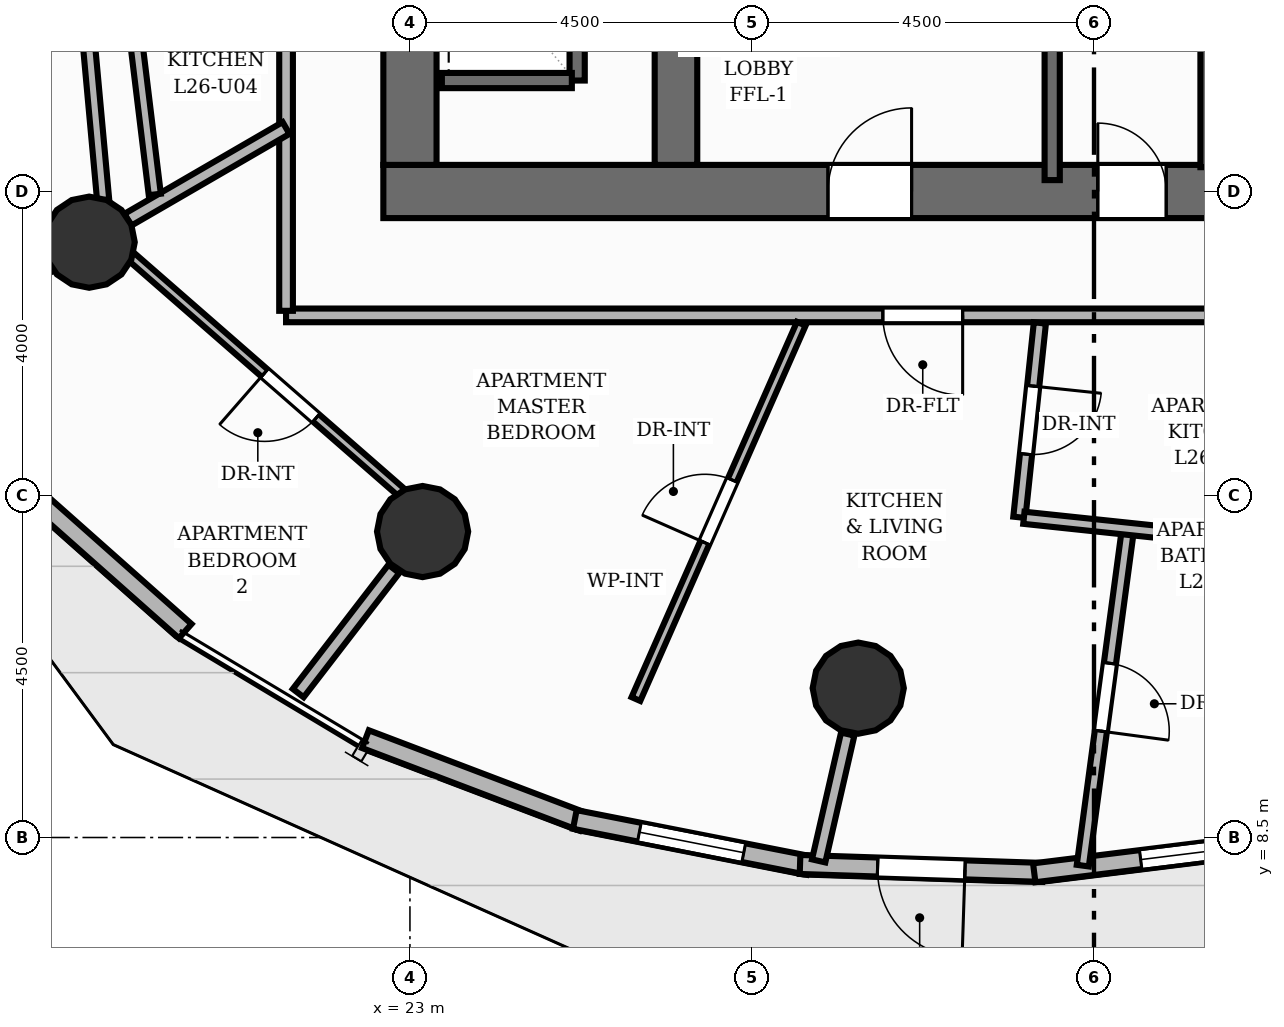
"""IFC4 building model, lengths in metres.
Left out: names, types, materials, properties, quantities, classifications, styles, units other than length and angle.
Written with IfcOpenShell. Run it as: python <this file> out.ifc"""

import sys

from ifc_helpers import new_model, si_unit, direction, frame, frame_2d, origin, origin_2d, place, context, subcontext, project, spatial, rectangle, circle, extrude, element, fill, save


model = new_model("IFC4")
c1 = context("Model", 3, precision=1e-05, world=origin(), true_north=direction((0.0, 1.0)))
c2 = subcontext(c1, "Body", "Model", "MODEL_VIEW")
j1 = project(units=[si_unit("LENGTHUNIT", "METRE"), si_unit("PLANEANGLEUNIT", "RADIAN")], contexts=[c1])
p1 = place(None, origin())
s1 = spatial("IfcSite", under=j1, at=p1, CompositionType="ELEMENT")
p2 = place(p1, origin())
s2 = spatial("IfcBuilding", under=s1, at=p2, CompositionType="ELEMENT")
p3 = place(p2, frame((0.0, 0.0, 90.08)))
s3 = spatial("IfcBuildingStorey", under=s2, at=p3, CompositionType="ELEMENT", Elevation=90.08)
p4 = place(p3, frame((22.65, 17.0, 0.0), z_axis=(0.0, 0.0, 1.0), x_axis=(1.0, 0.0, 0.0)))
e1 = element("IfcWall", 1, at=p4, inside=s3, PredefinedType="SHEAR", context=c2, shape_type="SweptSolid", body=[
    extrude(rectangle(XDim=18.7, YDim=0.7, at=frame_2d((9.35, 0.0))), origin(), (0.0, 0.0, 1.0), 3.2),
])
p5 = place(p4, frame((5.85, 0.0, 0.0)))
e2 = element("IfcOpeningElement", 2, at=p5, cuts=e1, PredefinedType="OPENING", context=c2, shape_type="SweptSolid", body=[
    extrude(rectangle(XDim=1.1, YDim=2.15, at=frame_2d((0.55, 1.075))), frame((0.0, 0.36, 0.0), z_axis=(0.0, -1.0, 0.0), x_axis=(1.0, 0.0, 0.0)), (0.0, 0.0, 1.0), 0.72),
])
p6 = place(p4, frame((9.4, 0.0, 0.0)))
e3 = element("IfcOpeningElement", 3, at=p6, cuts=e1, PredefinedType="OPENING", context=c2, shape_type="SweptSolid", body=[
    extrude(rectangle(XDim=0.9, YDim=2.1, at=frame_2d((0.45, 1.05))), frame((0.0, 0.36, 0.0), z_axis=(0.0, -1.0, 0.0), x_axis=(1.0, 0.0, 0.0)), (0.0, 0.0, 1.0), 0.72),
])
p7 = place(p3, frame((23.0, 17.35, 0.0), z_axis=(0.0, 0.0, 1.0), x_axis=(0.0, 1.0, 0.0)))
e4 = element("IfcWall", 4, at=p7, inside=s3, PredefinedType="SHEAR", context=c2, shape_type="SweptSolid", body=[
    extrude(rectangle(XDim=13.3, YDim=0.7, at=frame_2d((6.65, 0.0))), origin(), (0.0, 0.0, 1.0), 3.2),
])
p8 = place(p3, frame((26.5, 17.35, 0.0), z_axis=(0.0, 0.0, 1.0), x_axis=(0.0, 1.0, 0.0)))
e5 = element("IfcWall", 5, at=p8, inside=s3, PredefinedType="SHEAR", context=c2, shape_type="SweptSolid", body=[
    extrude(rectangle(XDim=13.3, YDim=0.56, at=frame_2d((6.65, 0.0))), origin(), (0.0, 0.0, 1.0), 3.2),
])
for number, where, z_axis, x_axis in (
    (6, (18.78, 16.333, 0.0), (0.0, 0.0, 1.0), (1.0, 0.0, 0.0)),
    (7, (23.167, 12.526, 0.0), (0.0, 0.0, 1.0), (1.0, 0.0, 0.0)),
    (8, (28.898, 10.465, 0.0), (0.0, 0.0, 1.0), (1.0, 0.0, 0.0)),
):
    element("IfcColumn", number, at=place(p3, frame(where, z_axis=z_axis, x_axis=x_axis)), inside=s3, PredefinedType="COLUMN", context=c2, shape_type="SweptSolid", body=[
        extrude(circle(Radius=0.6, at=origin_2d()), origin(), (0.0, 0.0, 1.0), 3.2),
    ])
p9 = place(p3, frame((20.043, 11.216, 0.0), z_axis=(0.0, 0.0, 1.0), x_axis=(-0.747828492436, 0.663891968547, 0.0)))
e9 = element("IfcWall", 9, at=p9, inside=s3, PredefinedType="SOLIDWALL", context=c2, shape_type="SweptSolid", body=[
    extrude(rectangle(XDim=2.923, YDim=0.25, at=frame_2d((1.461, 0.0))), origin(), (0.0, 0.0, 1.0), 2.96),
])
p10 = place(p3, frame((25.276, 8.707, 0.0), z_axis=(0.0, 0.0, 1.0), x_axis=(-0.934815891493, 0.355132720277, 0.0)))
e10 = element("IfcWall", 10, at=p10, inside=s3, PredefinedType="SOLIDWALL", context=c2, shape_type="SweptSolid", body=[
    extrude(rectangle(XDim=3.061, YDim=0.25, at=frame_2d((1.53, 0.0))), origin(), (0.0, 0.0, 1.0), 2.96),
])
p11 = place(p3, frame((28.242, 8.133, 0.0), z_axis=(0.0, 0.0, 1.0), x_axis=(-0.981187677549, 0.193056316721, 0.0)))
e11 = element("IfcWall", 11, at=p11, inside=s3, PredefinedType="SOLIDWALL", context=c2, shape_type="SweptSolid", body=[
    extrude(rectangle(XDim=3.131, YDim=0.25, at=frame_2d((1.565, 0.0))), origin(), (0.0, 0.0, 1.0), 2.96),
])
p12 = place(p11, frame((0.866, 0.0, 0.85)))
e12 = element("IfcOpeningElement", 12, at=p12, cuts=e11, PredefinedType="OPENING", context=c2, shape_type="SweptSolid", body=[
    extrude(rectangle(XDim=1.4, YDim=1.55, at=frame_2d((0.7, 0.775))), frame((0.0, 0.135, 0.0), z_axis=(0.0, -1.0, 0.0), x_axis=(1.0, 0.0, 0.0)), (0.0, 0.0, 1.0), 0.27),
])
p13 = place(p3, frame((31.323, 8.041, 0.0), z_axis=(0.0, 0.0, 1.0), x_axis=(-0.999464092211, 0.032734208101, 0.0)))
e13 = element("IfcWall", 13, at=p13, inside=s3, PredefinedType="SOLIDWALL", context=c2, shape_type="SweptSolid", body=[
    extrude(rectangle(XDim=3.192, YDim=0.25, at=frame_2d((1.596, 0.0))), origin(), (0.0, 0.0, 1.0), 2.96),
])
p14 = place(p13, frame((1.021, 0.0, 0.0)))
e14 = element("IfcOpeningElement", 14, at=p14, cuts=e13, PredefinedType="OPENING", context=c2, shape_type="SweptSolid", body=[
    extrude(rectangle(XDim=1.15, YDim=2.2, at=frame_2d((0.575, 1.1))), frame((0.0, 0.135, 0.0), z_axis=(0.0, -1.0, 0.0), x_axis=(1.0, 0.0, 0.0)), (0.0, 0.0, 1.0), 0.27),
])
p15 = place(p3, frame((34.425, 8.434, 0.0), z_axis=(0.0, 0.0, 1.0), x_axis=(-0.99241077266, -0.122966899235, 0.0)))
e15 = element("IfcWall", 15, at=p15, inside=s3, PredefinedType="SOLIDWALL", context=c2, shape_type="SweptSolid", body=[
    extrude(rectangle(XDim=3.236, YDim=0.25, at=frame_2d((1.618, 0.0))), origin(), (0.0, 0.0, 1.0), 2.96),
])
p16 = place(p15, frame((0.175, 0.0, 0.85)))
e16 = element("IfcOpeningElement", 16, at=p16, cuts=e15, PredefinedType="OPENING", context=c2, shape_type="SweptSolid", body=[
    extrude(rectangle(XDim=1.65, YDim=1.55, at=frame_2d((0.825, 0.775))), frame((0.0, 0.135, 0.0), z_axis=(0.0, -1.0, 0.0), x_axis=(1.0, 0.0, 0.0)), (0.0, 0.0, 1.0), 0.27),
])
p17 = place(p3, frame((31.45, 17.15, 0.0), z_axis=(0.0, 0.0, 1.0), x_axis=(0.0, 1.0, 0.0)))
e17 = element("IfcWall", 17, at=p17, inside=s3, PredefinedType="SHEAR", context=c2, shape_type="SweptSolid", body=[
    extrude(rectangle(XDim=3.5, YDim=0.2, at=frame_2d((1.75, 0.0))), origin(), (0.0, 0.0, 1.0), 3.2),
])
p18 = place(p3, frame((25.2, 18.46, 0.0), z_axis=(0.0, 0.0, 1.0), x_axis=(0.0, 1.0, 0.0)))
e18 = element("IfcWall", 18, at=p18, inside=s3, PredefinedType="SHEAR", context=c2, shape_type="SweptSolid", body=[
    extrude(rectangle(XDim=11.08, YDim=0.2, at=frame_2d((5.54, 0.0))), origin(), (0.0, 0.0, 1.0), 3.2),
])
p19 = place(p3, frame((23.42, 18.46, 0.0), z_axis=(0.0, 0.0, 1.0), x_axis=(1.0, 0.0, 0.0)))
e19 = element("IfcWall", 19, at=p19, inside=s3, PredefinedType="SHEAR", context=c2, shape_type="SweptSolid", body=[
    extrude(rectangle(XDim=1.71, YDim=0.2, at=frame_2d((0.855, 0.0))), origin(), (0.0, 0.0, 1.0), 3.2),
])
p20 = place(p3, frame((33.5, 17.32, 0.0), z_axis=(0.0, 0.0, 1.0), x_axis=(0.0, 1.0, 0.0)))
e20 = element("IfcWall", 20, at=p20, inside=s3, PredefinedType="SHEAR", context=c2, shape_type="SweptSolid", body=[
    extrude(rectangle(XDim=1.86, YDim=0.2, at=frame_2d((0.93, 0.0))), origin(), (0.0, 0.0, 1.0), 3.2),
])
p21 = place(p3, frame((18.243, 16.022, 0.0), z_axis=(0.0, 0.0, 1.0), x_axis=(-0.865046065875, -0.501692439563, 0.0)))
e21 = element("IfcWall", 21, at=p21, inside=s3, PredefinedType="PARTITIONING", context=c2, shape_type="SweptSolid", body=[
    extrude(rectangle(XDim=1.994, YDim=0.18, at=frame_2d((0.997, 0.0))), origin(), (0.0, 0.0, 1.0), 2.26),
])
p22 = place(p3, frame((22.788, 12.034, 0.0), z_axis=(0.0, 0.0, 1.0), x_axis=(-0.609991040385, -0.792408310564, 0.0)))
e22 = element("IfcWall", 22, at=p22, inside=s3, PredefinedType="PARTITIONING", context=c2, shape_type="SweptSolid", body=[
    extrude(rectangle(XDim=2.062, YDim=0.18, at=frame_2d((1.031, 0.0))), origin(), (0.0, 0.0, 1.0), 2.26),
])
p23 = place(p3, frame((28.76, 9.861, 0.0), z_axis=(0.0, 0.0, 1.0), x_axis=(-0.223359217097, -0.974736200281, 0.0)))
e23 = element("IfcWall", 23, at=p23, inside=s3, PredefinedType="PARTITIONING", context=c2, shape_type="SweptSolid", body=[
    extrude(rectangle(XDim=1.712, YDim=0.18, at=frame_2d((0.856, 0.0))), origin(), (0.0, 0.0, 1.0), 2.26),
])
p24 = place(p3, frame((41.695, 15.37, 0.0), z_axis=(0.0, 0.0, 1.0), x_axis=(-1.0, 0.0, 0.0)))
e24 = element("IfcWall", 24, at=p24, inside=s3, PredefinedType="PARTITIONING", context=c2, shape_type="SweptSolid", body=[
    extrude(rectangle(XDim=20.325, YDim=0.18, at=frame_2d((10.163, 0.0))), origin(), (0.0, 0.0, 1.0), 2.955),
])
p25 = place(p24, frame((11.424, 0.0, 0.0)))
e25 = element("IfcOpeningElement", 25, at=p25, cuts=e24, PredefinedType="OPENING", context=c2, shape_type="SweptSolid", body=[
    extrude(rectangle(XDim=1.05, YDim=2.15, at=frame_2d((0.525, 1.075))), frame((0.0, 0.1, 0.0), z_axis=(0.0, -1.0, 0.0), x_axis=(1.0, 0.0, 0.0)), (0.0, 0.0, 1.0), 0.2),
])
p26 = place(p3, frame((21.37, 15.43, 0.0), z_axis=(0.0, 0.0, 1.0), x_axis=(0.0, 1.0, 0.0)))
e26 = element("IfcWall", 26, at=p26, inside=s3, PredefinedType="PARTITIONING", context=c2, shape_type="SweptSolid", body=[
    extrude(rectangle(XDim=7.727, YDim=0.18, at=frame_2d((3.863, 0.0))), origin(), (0.0, 0.0, 1.0), 2.955),
])
p27 = place(p3, frame((32.448, 12.562, 0.0), z_axis=(0.0, 0.0, 1.0), x_axis=(-0.132986130607, -0.991117898671, 0.0)))
e27 = element("IfcWall", 27, at=p27, inside=s3, PredefinedType="PLUMBINGWALL", context=c2, shape_type="SweptSolid", body=[
    extrude(rectangle(XDim=4.472, YDim=0.16, at=frame_2d((2.236, 0.0))), origin(), (0.0, 0.0, 1.0), 2.955),
])
p28 = place(p27, frame((1.786, 0.0, 0.0)))
e28 = element("IfcOpeningElement", 28, at=p28, cuts=e27, PredefinedType="OPENING", context=c2, shape_type="SweptSolid", body=[
    extrude(rectangle(XDim=0.9, YDim=2.1, at=frame_2d((0.45, 1.05))), frame((0.0, 0.09, 0.0), z_axis=(0.0, -1.0, 0.0), x_axis=(1.0, 0.0, 0.0)), (0.0, 0.0, 1.0), 0.18),
])
p29 = place(p3, frame((25.973, 10.322, 0.0), z_axis=(0.0, 0.0, 1.0), x_axis=(0.403235845427, 0.91509608947, 0.0)))
e29 = element("IfcWall", 29, at=p29, inside=s3, PredefinedType="PARTITIONING", context=c2, shape_type="SweptSolid", body=[
    extrude(rectangle(XDim=5.396, YDim=0.125, at=frame_2d((2.698, 0.0))), origin(), (0.0, 0.0, 1.0), 2.955),
])
p30 = place(p29, frame((2.248, 0.0, 0.0)))
e30 = element("IfcOpeningElement", 30, at=p30, cuts=e29, PredefinedType="OPENING", context=c2, shape_type="SweptSolid", body=[
    extrude(rectangle(XDim=0.9, YDim=2.1, at=frame_2d((0.45, 1.05))), frame((0.0, 0.073, 0.0), z_axis=(0.0, -1.0, 0.0), x_axis=(1.0, 0.0, 0.0)), (0.0, 0.0, 1.0), 0.145),
])
p31 = place(p3, frame((31.288, 15.271, 0.0), z_axis=(0.0, 0.0, 1.0), x_axis=(-0.105094954285, -0.994462191631, 0.0)))
e31 = element("IfcWall", 31, at=p31, inside=s3, PredefinedType="PLUMBINGWALL", context=c2, shape_type="SweptSolid", body=[
    extrude(rectangle(XDim=2.572, YDim=0.16, at=frame_2d((1.286, 0.0))), origin(), (0.0, 0.0, 1.0), 2.641),
])
p32 = place(p31, frame((0.836, 0.0, 0.0)))
e32 = element("IfcOpeningElement", 32, at=p32, cuts=e31, PredefinedType="OPENING", context=c2, shape_type="SweptSolid", body=[
    extrude(rectangle(XDim=0.9, YDim=2.1, at=frame_2d((0.45, 1.05))), frame((0.0, 0.09, 0.0), z_axis=(0.0, -1.0, 0.0), x_axis=(1.0, 0.0, 0.0)), (0.0, 0.0, 1.0), 0.18),
])
p33 = place(p3, frame((31.077, 12.707, 0.0), z_axis=(0.0, 0.0, 1.0), x_axis=(0.994472124215, -0.105000924563, 0.0)))
e33 = element("IfcWall", 33, at=p33, inside=s3, PredefinedType="PLUMBINGWALL", context=c2, shape_type="SweptSolid", body=[
    extrude(rectangle(XDim=3.618, YDim=0.16, at=frame_2d((1.809, 0.0))), origin(), (0.0, 0.0, 1.0), 2.955),
])
p34 = place(p3, frame((22.888, 13.04, 0.0), z_axis=(0.0, 0.0, 1.0), x_axis=(-0.753425123405, 0.657533712765, 0.0)))
e34 = element("IfcWall", 34, at=p34, inside=s3, PredefinedType="PARTITIONING", context=c2, shape_type="SweptSolid", body=[
    extrude(rectangle(XDim=4.72, YDim=0.125, at=frame_2d((2.36, 0.0))), origin(), (0.0, 0.0, 1.0), 2.403),
])
p35 = place(p34, frame((1.49, 0.0, 0.0)))
e35 = element("IfcOpeningElement", 35, at=p35, cuts=e34, PredefinedType="OPENING", context=c2, shape_type="SweptSolid", body=[
    extrude(rectangle(XDim=0.9, YDim=2.1, at=frame_2d((0.45, 1.05))), frame((0.0, 0.073, 0.0), z_axis=(0.0, -1.0, 0.0), x_axis=(1.0, 0.0, 0.0)), (0.0, 0.0, 1.0), 0.145),
])
p36 = place(p3, frame((19.288, 16.628, 0.0), z_axis=(0.0, 0.0, 1.0), x_axis=(0.86502326608, 0.501731750182, 0.0)))
e36 = element("IfcWall", 36, at=p36, inside=s3, PredefinedType="PARTITIONING", context=c2, shape_type="SweptSolid", body=[
    extrude(rectangle(XDim=2.407, YDim=0.18, at=frame_2d((1.204, 0.0))), origin(), (0.0, 0.0, 1.0), 2.26),
])
p37 = place(p3, frame((18.964, 16.887, 0.0), z_axis=(0.0, 0.0, 1.0), x_axis=(-0.091023836021, 0.995848714051, 0.0)))
e37 = element("IfcWall", 37, at=p37, inside=s3, PredefinedType="PLUMBINGWALL", context=c2, shape_type="SweptSolid", body=[
    extrude(rectangle(XDim=3.157, YDim=0.16, at=frame_2d((1.579, 0.0))), origin(), (0.0, 0.0, 1.0), 2.955),
])
p38 = place(p3, frame((18.935, 22.782, 0.0), z_axis=(0.0, 0.0, 1.0), x_axis=(0.120703145243, -0.992688647426, 0.0)))
e38 = element("IfcWall", 38, at=p38, inside=s3, PredefinedType="PLUMBINGWALL", context=c2, shape_type="SweptSolid", body=[
    extrude(rectangle(XDim=5.864, YDim=0.16, at=frame_2d((2.932, 0.0))), origin(), (0.0, 0.0, 1.0), 2.955),
])
p39 = place(p38, frame((1.642, 0.0, 0.0)))
e39 = element("IfcOpeningElement", 39, at=p39, cuts=e38, PredefinedType="OPENING", context=c2, shape_type="SweptSolid", body=[
    extrude(rectangle(XDim=0.9, YDim=2.1, at=frame_2d((0.45, 1.05))), frame((0.0, 0.09, 0.0), z_axis=(0.0, -1.0, 0.0), x_axis=(1.0, 0.0, 0.0)), (0.0, 0.0, 1.0), 0.18),
])
p40 = place(p14, origin())
e40 = element("IfcDoor", 40, at=p40, inside=s3, OperationType="SINGLE_SWING_LEFT", PredefinedType="DOOR", context=c2, shape_type="SweptSolid", body=[
    extrude(rectangle(XDim=1.15, YDim=2.2, at=frame_2d((0.575, 1.1))), frame((0.0, 0.025, 0.0), z_axis=(0.0, -1.0, 0.0), x_axis=(1.0, 0.0, 0.0)), (0.0, 0.0, 1.0), 0.05),
])
fill(e14, e40)
p41 = place(p12, origin())
e41 = element("IfcWindow", 41, at=p41, inside=s3, PartitioningType="SINGLE_PANEL", PredefinedType="WINDOW", context=c2, shape_type="SweptSolid", body=[
    extrude(rectangle(XDim=1.4, YDim=1.55, at=frame_2d((0.7, 0.775))), frame((0.0, 0.03, 0.0), z_axis=(0.0, -1.0, 0.0), x_axis=(1.0, 0.0, 0.0)), (0.0, 0.0, 1.0), 0.06),
])
fill(e12, e41)
p42 = place(p16, origin())
e42 = element("IfcWindow", 42, at=p42, inside=s3, PartitioningType="SINGLE_PANEL", PredefinedType="WINDOW", context=c2, shape_type="SweptSolid", body=[
    extrude(rectangle(XDim=1.65, YDim=1.55, at=frame_2d((0.825, 0.775))), frame((0.0, 0.03, 0.0), z_axis=(0.0, -1.0, 0.0), x_axis=(1.0, 0.0, 0.0)), (0.0, 0.0, 1.0), 0.06),
])
fill(e16, e42)
p43 = place(p5, origin())
e43 = element("IfcDoor", 43, at=p43, inside=s3, OperationType="SINGLE_SWING_RIGHT", PredefinedType="DOOR", context=c2, shape_type="SweptSolid", body=[
    extrude(rectangle(XDim=1.1, YDim=2.15, at=frame_2d((0.55, 1.075))), frame((0.0, 0.025, 0.0), z_axis=(0.0, -1.0, 0.0), x_axis=(1.0, 0.0, 0.0)), (0.0, 0.0, 1.0), 0.05),
])
fill(e2, e43)
p44 = place(p6, origin())
e44 = element("IfcDoor", 44, at=p44, inside=s3, OperationType="SINGLE_SWING_LEFT", PredefinedType="DOOR", context=c2, shape_type="SweptSolid", body=[
    extrude(rectangle(XDim=0.9, YDim=2.1, at=frame_2d((0.45, 1.05))), frame((0.0, 0.025, 0.0), z_axis=(0.0, -1.0, 0.0), x_axis=(1.0, 0.0, 0.0)), (0.0, 0.0, 1.0), 0.05),
])
fill(e3, e44)
p45 = place(p25, origin())
e45 = element("IfcDoor", 45, at=p45, inside=s3, OperationType="SINGLE_SWING_LEFT", PredefinedType="DOOR", context=c2, shape_type="SweptSolid", body=[
    extrude(rectangle(XDim=1.05, YDim=2.15, at=frame_2d((0.525, 1.075))), frame((0.0, 0.025, 0.0), z_axis=(0.0, -1.0, 0.0), x_axis=(1.0, 0.0, 0.0)), (0.0, 0.0, 1.0), 0.05),
])
fill(e25, e45)
p46 = place(p28, origin())
e46 = element("IfcDoor", 46, at=p46, inside=s3, OperationType="SINGLE_SWING_RIGHT", PredefinedType="DOOR", context=c2, shape_type="SweptSolid", body=[
    extrude(rectangle(XDim=0.9, YDim=2.1, at=frame_2d((0.45, 1.05))), frame((0.0, 0.025, 0.0), z_axis=(0.0, -1.0, 0.0), x_axis=(1.0, 0.0, 0.0)), (0.0, 0.0, 1.0), 0.05),
])
fill(e28, e46)
p47 = place(p30, origin())
e47 = element("IfcDoor", 47, at=p47, inside=s3, OperationType="SINGLE_SWING_LEFT", PredefinedType="DOOR", context=c2, shape_type="SweptSolid", body=[
    extrude(rectangle(XDim=0.9, YDim=2.1, at=frame_2d((0.45, 1.05))), frame((0.0, 0.025, 0.0), z_axis=(0.0, -1.0, 0.0), x_axis=(1.0, 0.0, 0.0)), (0.0, 0.0, 1.0), 0.05),
])
fill(e30, e47)
p48 = place(p35, origin())
e48 = element("IfcDoor", 48, at=p48, inside=s3, OperationType="SINGLE_SWING_RIGHT", PredefinedType="DOOR", context=c2, shape_type="SweptSolid", body=[
    extrude(rectangle(XDim=0.9, YDim=2.1, at=frame_2d((0.45, 1.05))), frame((0.0, 0.025, 0.0), z_axis=(0.0, -1.0, 0.0), x_axis=(1.0, 0.0, 0.0)), (0.0, 0.0, 1.0), 0.05),
])
fill(e35, e48)
p49 = place(p32, origin())
e49 = element("IfcDoor", 49, at=p49, inside=s3, OperationType="SINGLE_SWING_LEFT", PredefinedType="DOOR", context=c2, shape_type="SweptSolid", body=[
    extrude(rectangle(XDim=0.9, YDim=2.1, at=frame_2d((0.45, 1.05))), frame((0.0, 0.025, 0.0), z_axis=(0.0, -1.0, 0.0), x_axis=(1.0, 0.0, 0.0)), (0.0, 0.0, 1.0), 0.05),
])
fill(e32, e49)
save(model, sys.argv[1])
